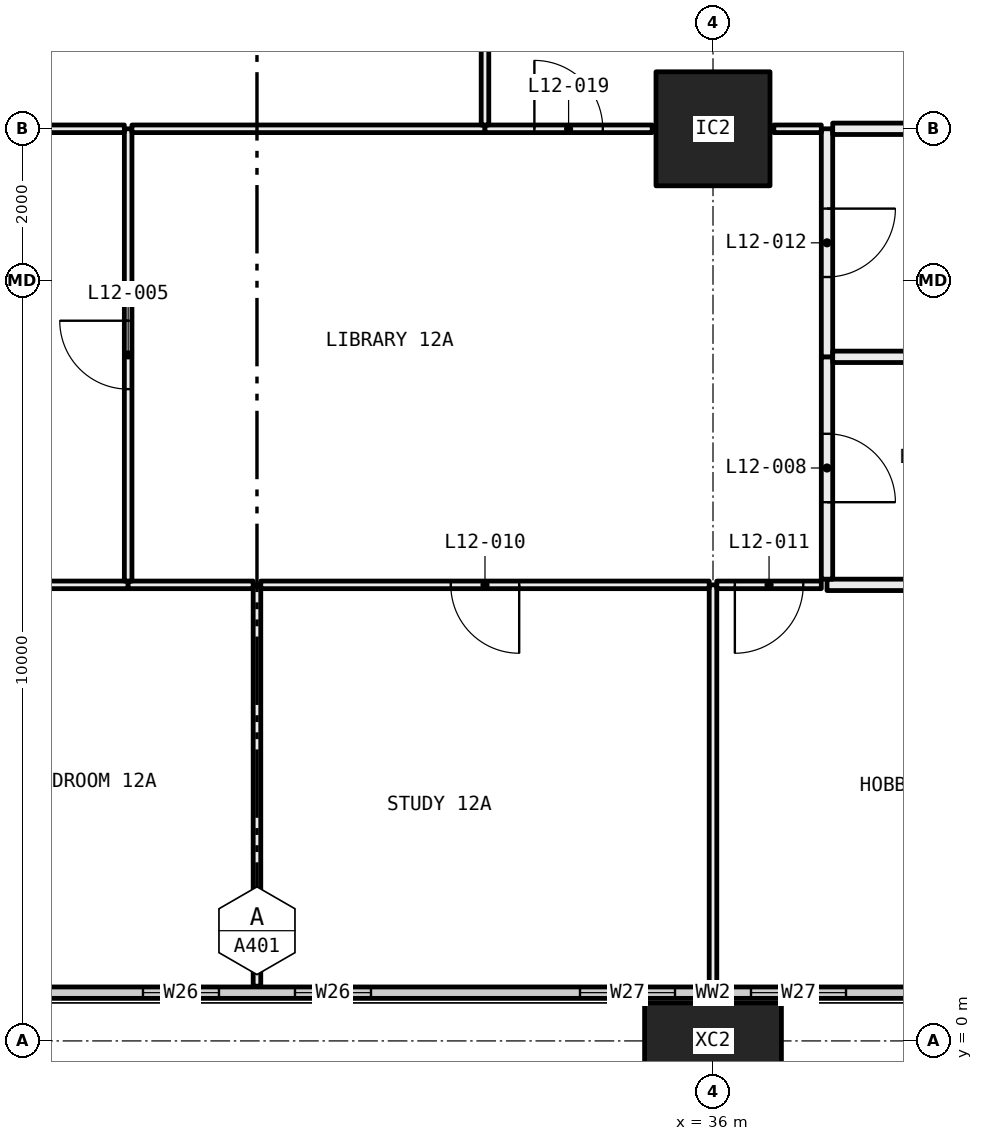
"""IFC4 building model, lengths in metres.
Left out: names, types, materials, properties, quantities, classifications, styles, units other than length and angle.
Written with IfcOpenShell. Run it as: python <this file> out.ifc"""

import sys

from ifc_helpers import new_model, si_unit, direction, frame, frame_2d, origin, origin_2d, place, context, subcontext, project, spatial, rectangle, hollow_rectangle, extrude, element, fill, save


model = new_model("IFC4")
c1 = context("Model", 3, precision=1e-05, world=origin(), true_north=direction((0.0, 1.0)))
c2 = subcontext(c1, "Body", "Model", "MODEL_VIEW")
j1 = project(units=[si_unit("LENGTHUNIT", "METRE"), si_unit("PLANEANGLEUNIT", "RADIAN")], contexts=[c1])
p1 = place(None, origin())
s1 = spatial("IfcSite", under=j1, at=p1, CompositionType="ELEMENT")
p2 = place(p1, origin())
s2 = spatial("IfcBuilding", under=s1, at=p2, CompositionType="ELEMENT")
p3 = place(p2, frame((0.0, 0.0, 54.15)))
s3 = spatial("IfcBuildingStorey", under=s2, at=p3, CompositionType="ELEMENT", Elevation=54.15)
p4 = place(p3, frame((36.0, 0.0, -0.4), z_axis=(0.0, 0.0, 1.0), x_axis=(1.0, 0.0, 0.0)))
e1 = element("IfcColumn", 1, at=p4, inside=s3, PredefinedType="COLUMN", context=c2, shape_type="SweptSolid", body=[
    extrude(hollow_rectangle(XDim=1.8, YDim=1.0, WallThickness=0.07, at=origin_2d()), origin(), (0.0, 0.0, 1.0), 3.45),
])
p5 = place(p3, frame((36.0, 12.0, 0.0), z_axis=(0.0, 0.0, 1.0), x_axis=(1.0, 0.0, 0.0)))
e2 = element("IfcColumn", 2, at=p5, inside=s3, PredefinedType="COLUMN", context=c2, shape_type="SweptSolid", body=[
    extrude(hollow_rectangle(XDim=1.5, YDim=1.5, WallThickness=0.065, at=origin_2d()), origin(), (0.0, 0.0, 1.0), 3.05),
])
p6 = place(p3, frame((6.56, 0.635, 0.0), z_axis=(0.0, 0.0, 1.0), x_axis=(1.0, 0.0, 0.0)))
e3 = element("IfcWall", 3, at=p6, inside=s3, PredefinedType="ELEMENTEDWALL", context=c2, shape_type="SweptSolid", body=[
    extrude(rectangle(XDim=58.88, YDim=0.15, at=frame_2d((29.44, 0.0))), origin(), (0.0, 0.0, 1.0), 3.05),
])
p7 = place(p6, frame((0.44, 0.0, 0.45)))
e4 = element("IfcOpeningElement", 4, at=p7, cuts=e3, PredefinedType="OPENING", context=c2, shape_type="SweptSolid", body=[
    extrude(rectangle(XDim=4.5, YDim=2.55, at=frame_2d((2.25, 1.275))), frame((0.0, 0.085, 0.0), z_axis=(0.0, -1.0, 0.0), x_axis=(1.0, 0.0, 0.0)), (0.0, 0.0, 1.0), 0.17),
])
p8 = place(p6, frame((5.94, 0.0, 0.45)))
e5 = element("IfcOpeningElement", 5, at=p8, cuts=e3, PredefinedType="OPENING", context=c2, shape_type="SweptSolid", body=[
    extrude(rectangle(XDim=1.25, YDim=2.55, at=frame_2d((0.625, 1.275))), frame((0.0, 0.085, 0.0), z_axis=(0.0, -1.0, 0.0), x_axis=(1.0, 0.0, 0.0)), (0.0, 0.0, 1.0), 0.17),
])
p9 = place(p6, frame((9.94, 0.0, 0.45)))
e6 = element("IfcOpeningElement", 6, at=p9, cuts=e3, PredefinedType="OPENING", context=c2, shape_type="SweptSolid", body=[
    extrude(rectangle(XDim=1.0, YDim=2.55, at=frame_2d((0.5, 1.275))), frame((0.0, 0.085, 0.0), z_axis=(0.0, -1.0, 0.0), x_axis=(1.0, 0.0, 0.0)), (0.0, 0.0, 1.0), 0.17),
])
p10 = place(p6, frame((11.94, 0.0, 0.45)))
e7 = element("IfcOpeningElement", 7, at=p10, cuts=e3, PredefinedType="OPENING", context=c2, shape_type="SweptSolid", body=[
    extrude(rectangle(XDim=1.0, YDim=2.55, at=frame_2d((0.5, 1.275))), frame((0.0, 0.085, 0.0), z_axis=(0.0, -1.0, 0.0), x_axis=(1.0, 0.0, 0.0)), (0.0, 0.0, 1.0), 0.17),
])
p11 = place(p6, frame((15.69, 0.0, 0.45)))
e8 = element("IfcOpeningElement", 8, at=p11, cuts=e3, PredefinedType="OPENING", context=c2, shape_type="SweptSolid", body=[
    extrude(rectangle(XDim=1.25, YDim=2.55, at=frame_2d((0.625, 1.275))), frame((0.0, 0.085, 0.0), z_axis=(0.0, -1.0, 0.0), x_axis=(1.0, 0.0, 0.0)), (0.0, 0.0, 1.0), 0.17),
])
p12 = place(p6, frame((17.94, 0.0, 0.45)))
e9 = element("IfcOpeningElement", 9, at=p12, cuts=e3, PredefinedType="OPENING", context=c2, shape_type="SweptSolid", body=[
    extrude(rectangle(XDim=1.25, YDim=2.55, at=frame_2d((0.625, 1.275))), frame((0.0, 0.085, 0.0), z_axis=(0.0, -1.0, 0.0), x_axis=(1.0, 0.0, 0.0)), (0.0, 0.0, 1.0), 0.17),
])
p13 = place(p6, frame((21.94, 0.0, 0.45)))
e10 = element("IfcOpeningElement", 10, at=p13, cuts=e3, PredefinedType="OPENING", context=c2, shape_type="SweptSolid", body=[
    extrude(rectangle(XDim=1.0, YDim=2.55, at=frame_2d((0.5, 1.275))), frame((0.0, 0.085, 0.0), z_axis=(0.0, -1.0, 0.0), x_axis=(1.0, 0.0, 0.0)), (0.0, 0.0, 1.0), 0.17),
])
p14 = place(p6, frame((23.94, 0.0, 0.45)))
e11 = element("IfcOpeningElement", 11, at=p14, cuts=e3, PredefinedType="OPENING", context=c2, shape_type="SweptSolid", body=[
    extrude(rectangle(XDim=1.0, YDim=2.55, at=frame_2d((0.5, 1.275))), frame((0.0, 0.085, 0.0), z_axis=(0.0, -1.0, 0.0), x_axis=(1.0, 0.0, 0.0)), (0.0, 0.0, 1.0), 0.17),
])
p15 = place(p6, frame((27.69, 0.0, 0.45)))
e12 = element("IfcOpeningElement", 12, at=p15, cuts=e3, PredefinedType="OPENING", context=c2, shape_type="SweptSolid", body=[
    extrude(rectangle(XDim=1.25, YDim=2.55, at=frame_2d((0.625, 1.275))), frame((0.0, 0.085, 0.0), z_axis=(0.0, -1.0, 0.0), x_axis=(1.0, 0.0, 0.0)), (0.0, 0.0, 1.0), 0.17),
])
p16 = place(p6, frame((29.94, 0.0, 0.45)))
e13 = element("IfcOpeningElement", 13, at=p16, cuts=e3, PredefinedType="OPENING", context=c2, shape_type="SweptSolid", body=[
    extrude(rectangle(XDim=1.25, YDim=2.55, at=frame_2d((0.625, 1.275))), frame((0.0, 0.085, 0.0), z_axis=(0.0, -1.0, 0.0), x_axis=(1.0, 0.0, 0.0)), (0.0, 0.0, 1.0), 0.17),
])
p17 = place(p6, frame((33.94, 0.0, 0.45)))
e14 = element("IfcOpeningElement", 14, at=p17, cuts=e3, PredefinedType="OPENING", context=c2, shape_type="SweptSolid", body=[
    extrude(rectangle(XDim=1.0, YDim=2.55, at=frame_2d((0.5, 1.275))), frame((0.0, 0.085, 0.0), z_axis=(0.0, -1.0, 0.0), x_axis=(1.0, 0.0, 0.0)), (0.0, 0.0, 1.0), 0.17),
])
p18 = place(p6, frame((35.94, 0.0, 0.45)))
e15 = element("IfcOpeningElement", 15, at=p18, cuts=e3, PredefinedType="OPENING", context=c2, shape_type="SweptSolid", body=[
    extrude(rectangle(XDim=1.0, YDim=2.55, at=frame_2d((0.5, 1.275))), frame((0.0, 0.085, 0.0), z_axis=(0.0, -1.0, 0.0), x_axis=(1.0, 0.0, 0.0)), (0.0, 0.0, 1.0), 0.17),
])
p19 = place(p6, frame((39.69, 0.0, 0.45)))
e16 = element("IfcOpeningElement", 16, at=p19, cuts=e3, PredefinedType="OPENING", context=c2, shape_type="SweptSolid", body=[
    extrude(rectangle(XDim=1.25, YDim=2.55, at=frame_2d((0.625, 1.275))), frame((0.0, 0.085, 0.0), z_axis=(0.0, -1.0, 0.0), x_axis=(1.0, 0.0, 0.0)), (0.0, 0.0, 1.0), 0.17),
])
p20 = place(p6, frame((41.94, 0.0, 0.45)))
e17 = element("IfcOpeningElement", 17, at=p20, cuts=e3, PredefinedType="OPENING", context=c2, shape_type="SweptSolid", body=[
    extrude(rectangle(XDim=1.25, YDim=2.55, at=frame_2d((0.625, 1.275))), frame((0.0, 0.085, 0.0), z_axis=(0.0, -1.0, 0.0), x_axis=(1.0, 0.0, 0.0)), (0.0, 0.0, 1.0), 0.17),
])
p21 = place(p6, frame((45.94, 0.0, 0.45)))
e18 = element("IfcOpeningElement", 18, at=p21, cuts=e3, PredefinedType="OPENING", context=c2, shape_type="SweptSolid", body=[
    extrude(rectangle(XDim=1.0, YDim=2.55, at=frame_2d((0.5, 1.275))), frame((0.0, 0.085, 0.0), z_axis=(0.0, -1.0, 0.0), x_axis=(1.0, 0.0, 0.0)), (0.0, 0.0, 1.0), 0.17),
])
p22 = place(p6, frame((47.94, 0.0, 0.45)))
e19 = element("IfcOpeningElement", 19, at=p22, cuts=e3, PredefinedType="OPENING", context=c2, shape_type="SweptSolid", body=[
    extrude(rectangle(XDim=1.0, YDim=2.55, at=frame_2d((0.5, 1.275))), frame((0.0, 0.085, 0.0), z_axis=(0.0, -1.0, 0.0), x_axis=(1.0, 0.0, 0.0)), (0.0, 0.0, 1.0), 0.17),
])
p23 = place(p6, frame((51.69, 0.0, 0.45)))
e20 = element("IfcOpeningElement", 20, at=p23, cuts=e3, PredefinedType="OPENING", context=c2, shape_type="SweptSolid", body=[
    extrude(rectangle(XDim=1.25, YDim=2.55, at=frame_2d((0.625, 1.275))), frame((0.0, 0.085, 0.0), z_axis=(0.0, -1.0, 0.0), x_axis=(1.0, 0.0, 0.0)), (0.0, 0.0, 1.0), 0.17),
])
p24 = place(p6, frame((53.94, 0.0, 0.45)))
e21 = element("IfcOpeningElement", 21, at=p24, cuts=e3, PredefinedType="OPENING", context=c2, shape_type="SweptSolid", body=[
    extrude(rectangle(XDim=4.5, YDim=2.55, at=frame_2d((2.25, 1.275))), frame((0.0, 0.085, 0.0), z_axis=(0.0, -1.0, 0.0), x_axis=(1.0, 0.0, 0.0)), (0.0, 0.0, 1.0), 0.17),
])
p25 = place(p3, frame((30.0, 0.72, 0.0), z_axis=(0.0, 0.0, 1.0), x_axis=(0.0, 1.0, 0.0)))
e22 = element("IfcWall", 22, at=p25, inside=s3, PredefinedType="PARTITIONING", context=c2, shape_type="SweptSolid", body=[
    extrude(rectangle(XDim=5.28, YDim=0.1, at=frame_2d((2.64, 0.0))), origin(), (0.0, 0.0, 1.0), 3.05),
])
p26 = place(p3, frame((28.305, 6.0, 0.0), z_axis=(0.0, 0.0, 1.0), x_axis=(-1.0, 0.0, 0.0)))
e23 = element("IfcWall", 23, at=p26, inside=s3, PredefinedType="PARTITIONING", context=c2, shape_type="SweptSolid", body=[
    extrude(rectangle(XDim=4.255, YDim=0.1, at=frame_2d((2.127, 0.0))), origin(), (0.0, 0.0, 1.0), 2.45),
])
p27 = place(p3, frame((29.95, 6.0, 0.0), z_axis=(0.0, 0.0, 1.0), x_axis=(-1.0, 0.0, 0.0)))
e24 = element("IfcWall", 24, at=p27, inside=s3, PredefinedType="PARTITIONING", context=c2, shape_type="SweptSolid", body=[
    extrude(rectangle(XDim=1.645, YDim=0.1, at=frame_2d((0.823, 0.0))), origin(), (0.0, 0.0, 1.0), 3.05),
])
p28 = place(p3, frame((36.0, 0.72, 0.0), z_axis=(0.0, 0.0, 1.0), x_axis=(0.0, 1.0, 0.0)))
e25 = element("IfcWall", 25, at=p28, inside=s3, PredefinedType="PARTITIONING", context=c2, shape_type="SweptSolid", body=[
    extrude(rectangle(XDim=5.28, YDim=0.1, at=frame_2d((2.64, 0.0))), origin(), (0.0, 0.0, 1.0), 2.45),
])
p29 = place(p3, frame((35.95, 6.0, 0.0), z_axis=(0.0, 0.0, 1.0), x_axis=(-1.0, 0.0, 0.0)))
e26 = element("IfcWall", 26, at=p29, inside=s3, PredefinedType="PARTITIONING", context=c2, shape_type="SweptSolid", body=[
    extrude(rectangle(XDim=5.9, YDim=0.1, at=frame_2d((2.95, 0.0))), origin(), (0.0, 0.0, 1.0), 2.45),
])
p30 = place(p29, frame((2.5, 0.0, 0.0)))
e27 = element("IfcOpeningElement", 27, at=p30, cuts=e26, PredefinedType="OPENING", context=c2, shape_type="SweptSolid", body=[
    extrude(rectangle(XDim=0.9, YDim=2.1, at=frame_2d((0.45, 1.05))), frame((0.0, 0.06, 0.0), z_axis=(0.0, -1.0, 0.0), x_axis=(1.0, 0.0, 0.0)), (0.0, 0.0, 1.0), 0.12),
])
p31 = place(p3, frame((37.425, 6.0, 0.0), z_axis=(0.0, 0.0, 1.0), x_axis=(-1.0, 0.0, 0.0)))
e28 = element("IfcWall", 28, at=p31, inside=s3, PredefinedType="PARTITIONING", context=c2, shape_type="SweptSolid", body=[
    extrude(rectangle(XDim=1.375, YDim=0.1, at=frame_2d((0.688, 0.0))), origin(), (0.0, 0.0, 1.0), 2.45),
])
p32 = place(p31, frame((0.238, 0.0, 0.0)))
e29 = element("IfcOpeningElement", 29, at=p32, cuts=e28, PredefinedType="OPENING", context=c2, shape_type="SweptSolid", body=[
    extrude(rectangle(XDim=0.9, YDim=2.1, at=frame_2d((0.45, 1.05))), frame((0.0, 0.06, 0.0), z_axis=(0.0, -1.0, 0.0), x_axis=(1.0, 0.0, 0.0)), (0.0, 0.0, 1.0), 0.12),
])
p33 = place(p3, frame((41.9, 6.0, 0.0), z_axis=(0.0, 0.0, 1.0), x_axis=(-1.0, 0.0, 0.0)))
e30 = element("IfcWall", 30, at=p33, inside=s3, PredefinedType="PARTITIONING", context=c2, shape_type="SweptSolid", body=[
    extrude(rectangle(XDim=4.4, YDim=0.15, at=frame_2d((2.2, 0.0))), origin(), (0.0, 0.0, 1.0), 3.05),
])
p34 = place(p3, frame((28.305, 6.05, 0.0), z_axis=(0.0, 0.0, 1.0), x_axis=(0.0, 1.0, 0.0)))
e31 = element("IfcWall", 31, at=p34, inside=s3, PredefinedType="PARTITIONING", context=c2, shape_type="SweptSolid", body=[
    extrude(rectangle(XDim=5.95, YDim=0.1, at=frame_2d((2.975, 0.0))), origin(), (0.0, 0.0, 1.0), 2.45),
])
p35 = place(p34, frame((2.525, 0.0, 0.0)))
e32 = element("IfcOpeningElement", 32, at=p35, cuts=e31, PredefinedType="OPENING", context=c2, shape_type="SweptSolid", body=[
    extrude(rectangle(XDim=0.9, YDim=2.1, at=frame_2d((0.45, 1.05))), frame((0.0, 0.06, 0.0), z_axis=(0.0, -1.0, 0.0), x_axis=(1.0, 0.0, 0.0)), (0.0, 0.0, 1.0), 0.12),
])
p36 = place(p3, frame((28.255, 12.0, 0.0), z_axis=(0.0, 0.0, 1.0), x_axis=(-1.0, 0.0, 0.0)))
e33 = element("IfcWall", 33, at=p36, inside=s3, PredefinedType="PARTITIONING", context=c2, shape_type="SweptSolid", body=[
    extrude(rectangle(XDim=3.455, YDim=0.1, at=frame_2d((1.728, 0.0))), origin(), (0.0, 0.0, 1.0), 2.45),
])
p37 = place(p3, frame((37.5, 6.075, 0.0), z_axis=(0.0, 0.0, 1.0), x_axis=(0.0, 1.0, 0.0)))
e34 = element("IfcWall", 34, at=p37, inside=s3, PredefinedType="PARTITIONING", context=c2, shape_type="SweptSolid", body=[
    extrude(rectangle(XDim=2.925, YDim=0.15, at=frame_2d((1.462, 0.0))), origin(), (0.0, 0.0, 1.0), 3.05),
])
p38 = place(p37, frame((1.012, 0.0, 0.0)))
e35 = element("IfcOpeningElement", 35, at=p38, cuts=e34, PredefinedType="OPENING", context=c2, shape_type="SweptSolid", body=[
    extrude(rectangle(XDim=0.9, YDim=2.1, at=frame_2d((0.45, 1.05))), frame((0.0, 0.085, 0.0), z_axis=(0.0, -1.0, 0.0), x_axis=(1.0, 0.0, 0.0)), (0.0, 0.0, 1.0), 0.17),
])
p39 = place(p3, frame((37.5, 9.0, 0.0), z_axis=(0.0, 0.0, 1.0), x_axis=(0.0, 1.0, 0.0)))
e36 = element("IfcWall", 36, at=p39, inside=s3, PredefinedType="PARTITIONING", context=c2, shape_type="SweptSolid", body=[
    extrude(rectangle(XDim=3.0, YDim=0.15, at=frame_2d((1.5, 0.0))), origin(), (0.0, 0.0, 1.0), 2.45),
])
p40 = place(p39, frame((1.05, 0.0, 0.0)))
e37 = element("IfcOpeningElement", 37, at=p40, cuts=e36, PredefinedType="OPENING", context=c2, shape_type="SweptSolid", body=[
    extrude(rectangle(XDim=0.9, YDim=2.1, at=frame_2d((0.45, 1.05))), frame((0.0, 0.085, 0.0), z_axis=(0.0, -1.0, 0.0), x_axis=(1.0, 0.0, 0.0)), (0.0, 0.0, 1.0), 0.17),
])
p41 = place(p3, frame((33.0, 12.0, 0.0), z_axis=(0.0, 0.0, 1.0), x_axis=(-1.0, 0.0, 0.0)))
e38 = element("IfcWall", 38, at=p41, inside=s3, PredefinedType="PARTITIONING", context=c2, shape_type="SweptSolid", body=[
    extrude(rectangle(XDim=4.645, YDim=0.1, at=frame_2d((2.323, 0.0))), origin(), (0.0, 0.0, 1.0), 2.45),
])
p42 = place(p3, frame((35.2, 12.0, 0.0), z_axis=(0.0, 0.0, 1.0), x_axis=(-1.0, 0.0, 0.0)))
e39 = element("IfcWall", 39, at=p42, inside=s3, PredefinedType="PARTITIONING", context=c2, shape_type="SweptSolid", body=[
    extrude(rectangle(XDim=2.2, YDim=0.1, at=frame_2d((1.1, 0.0))), origin(), (0.0, 0.0, 1.0), 2.45),
])
p43 = place(p42, frame((0.65, 0.0, 0.0)))
e40 = element("IfcOpeningElement", 40, at=p43, cuts=e39, PredefinedType="OPENING", context=c2, shape_type="SweptSolid", body=[
    extrude(rectangle(XDim=0.9, YDim=2.1, at=frame_2d((0.45, 1.05))), frame((0.0, 0.06, 0.0), z_axis=(0.0, -1.0, 0.0), x_axis=(1.0, 0.0, 0.0)), (0.0, 0.0, 1.0), 0.12),
])
p44 = place(p3, frame((37.425, 12.0, 0.0), z_axis=(0.0, 0.0, 1.0), x_axis=(-1.0, 0.0, 0.0)))
e41 = element("IfcWall", 41, at=p44, inside=s3, PredefinedType="PARTITIONING", context=c2, shape_type="SweptSolid", body=[
    extrude(rectangle(XDim=0.625, YDim=0.1, at=frame_2d((0.312, 0.0))), origin(), (0.0, 0.0, 1.0), 2.45),
])
p45 = place(p3, frame((41.9, 9.0, 0.0), z_axis=(0.0, 0.0, 1.0), x_axis=(-1.0, 0.0, 0.0)))
e42 = element("IfcWall", 42, at=p45, inside=s3, PredefinedType="PARTITIONING", context=c2, shape_type="SweptSolid", body=[
    extrude(rectangle(XDim=4.325, YDim=0.15, at=frame_2d((2.163, 0.0))), origin(), (0.0, 0.0, 1.0), 3.05),
])
p46 = place(p3, frame((41.9, 12.0, 0.0), z_axis=(0.0, 0.0, 1.0), x_axis=(-1.0, 0.0, 0.0)))
e43 = element("IfcWall", 43, at=p46, inside=s3, PredefinedType="PARTITIONING", context=c2, shape_type="SweptSolid", body=[
    extrude(rectangle(XDim=4.325, YDim=0.15, at=frame_2d((2.163, 0.0))), origin(), (0.0, 0.0, 1.0), 2.45),
])
p47 = place(p3, frame((33.0, 12.05, 0.0), z_axis=(0.0, 0.0, 1.0), x_axis=(0.0, 1.0, 0.0)))
e44 = element("IfcWall", 44, at=p47, inside=s3, PredefinedType="PARTITIONING", context=c2, shape_type="SweptSolid", body=[
    extrude(rectangle(XDim=5.85, YDim=0.1, at=frame_2d((2.925, 0.0))), origin(), (0.0, 0.0, 1.0), 2.45),
])
p48 = place(p13, origin())
e45 = element("IfcWindow", 45, at=p48, inside=s3, PartitioningType="SINGLE_PANEL", PredefinedType="WINDOW", context=c2, shape_type="SweptSolid", body=[
    extrude(rectangle(XDim=1.0, YDim=2.55, at=frame_2d((0.5, 1.275))), frame((0.0, 0.03, 0.0), z_axis=(0.0, -1.0, 0.0), x_axis=(1.0, 0.0, 0.0)), (0.0, 0.0, 1.0), 0.06),
])
fill(e10, e45)
p49 = place(p14, origin())
e46 = element("IfcWindow", 46, at=p49, inside=s3, PartitioningType="SINGLE_PANEL", PredefinedType="WINDOW", context=c2, shape_type="SweptSolid", body=[
    extrude(rectangle(XDim=1.0, YDim=2.55, at=frame_2d((0.5, 1.275))), frame((0.0, 0.03, 0.0), z_axis=(0.0, -1.0, 0.0), x_axis=(1.0, 0.0, 0.0)), (0.0, 0.0, 1.0), 0.06),
])
fill(e11, e46)
p50 = place(p15, origin())
e47 = element("IfcWindow", 47, at=p50, inside=s3, PartitioningType="SINGLE_PANEL", PredefinedType="WINDOW", context=c2, shape_type="SweptSolid", body=[
    extrude(rectangle(XDim=1.25, YDim=2.55, at=frame_2d((0.625, 1.275))), frame((0.0, 0.03, 0.0), z_axis=(0.0, -1.0, 0.0), x_axis=(1.0, 0.0, 0.0)), (0.0, 0.0, 1.0), 0.06),
])
fill(e12, e47)
p51 = place(p16, origin())
e48 = element("IfcWindow", 48, at=p51, inside=s3, PartitioningType="SINGLE_PANEL", PredefinedType="WINDOW", context=c2, shape_type="SweptSolid", body=[
    extrude(rectangle(XDim=1.25, YDim=2.55, at=frame_2d((0.625, 1.275))), frame((0.0, 0.03, 0.0), z_axis=(0.0, -1.0, 0.0), x_axis=(1.0, 0.0, 0.0)), (0.0, 0.0, 1.0), 0.06),
])
fill(e13, e48)
p52 = place(p35, origin())
e49 = element("IfcDoor", 49, at=p52, inside=s3, OperationType="SINGLE_SWING_LEFT", PredefinedType="DOOR", context=c2, shape_type="SweptSolid", body=[
    extrude(rectangle(XDim=0.9, YDim=2.1, at=frame_2d((0.45, 1.05))), frame((0.0, 0.025, 0.0), z_axis=(0.0, -1.0, 0.0), x_axis=(1.0, 0.0, 0.0)), (0.0, 0.0, 1.0), 0.05),
])
fill(e32, e49)
p53 = place(p38, frame((0.9, 0.0, 0.0), x_axis=(-1.0, 0.0, 0.0)))
e50 = element("IfcDoor", 50, at=p53, inside=s3, OperationType="SINGLE_SWING_LEFT", PredefinedType="DOOR", context=c2, shape_type="SweptSolid", body=[
    extrude(rectangle(XDim=0.9, YDim=2.1, at=frame_2d((0.45, 1.05))), frame((0.0, 0.025, 0.0), z_axis=(0.0, -1.0, 0.0), x_axis=(1.0, 0.0, 0.0)), (0.0, 0.0, 1.0), 0.05),
])
fill(e35, e50)
p54 = place(p30, origin())
e51 = element("IfcDoor", 51, at=p54, inside=s3, OperationType="SINGLE_SWING_RIGHT", PredefinedType="DOOR", context=c2, shape_type="SweptSolid", body=[
    extrude(rectangle(XDim=0.9, YDim=2.1, at=frame_2d((0.45, 1.05))), frame((0.0, 0.025, 0.0), z_axis=(0.0, -1.0, 0.0), x_axis=(1.0, 0.0, 0.0)), (0.0, 0.0, 1.0), 0.05),
])
fill(e27, e51)
p55 = place(p32, origin())
e52 = element("IfcDoor", 52, at=p55, inside=s3, OperationType="SINGLE_SWING_LEFT", PredefinedType="DOOR", context=c2, shape_type="SweptSolid", body=[
    extrude(rectangle(XDim=0.9, YDim=2.1, at=frame_2d((0.45, 1.05))), frame((0.0, 0.025, 0.0), z_axis=(0.0, -1.0, 0.0), x_axis=(1.0, 0.0, 0.0)), (0.0, 0.0, 1.0), 0.05),
])
fill(e29, e52)
p56 = place(p40, frame((0.9, 0.0, 0.0), x_axis=(-1.0, 0.0, 0.0)))
e53 = element("IfcDoor", 53, at=p56, inside=s3, OperationType="SINGLE_SWING_RIGHT", PredefinedType="DOOR", context=c2, shape_type="SweptSolid", body=[
    extrude(rectangle(XDim=0.9, YDim=2.1, at=frame_2d((0.45, 1.05))), frame((0.0, 0.025, 0.0), z_axis=(0.0, -1.0, 0.0), x_axis=(1.0, 0.0, 0.0)), (0.0, 0.0, 1.0), 0.05),
])
fill(e37, e53)
p57 = place(p43, frame((0.9, 0.0, 0.0), x_axis=(-1.0, 0.0, 0.0)))
e54 = element("IfcDoor", 54, at=p57, inside=s3, OperationType="SINGLE_SWING_RIGHT", PredefinedType="DOOR", context=c2, shape_type="SweptSolid", body=[
    extrude(rectangle(XDim=0.9, YDim=2.1, at=frame_2d((0.45, 1.05))), frame((0.0, 0.025, 0.0), z_axis=(0.0, -1.0, 0.0), x_axis=(1.0, 0.0, 0.0)), (0.0, 0.0, 1.0), 0.05),
])
fill(e40, e54)
save(model, sys.argv[1])
